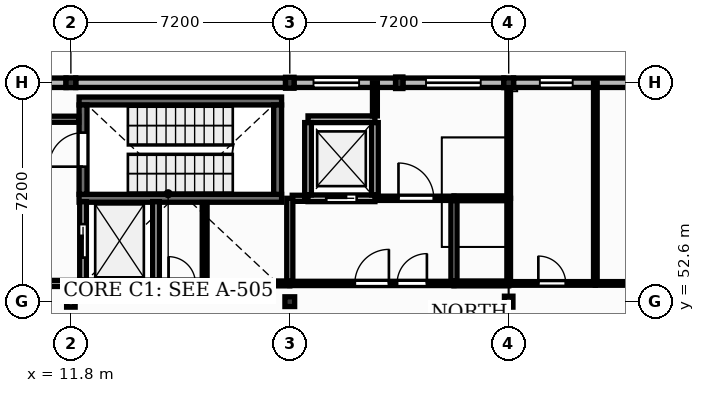
"""IFC4 building model, lengths in metres.
Left out: names, types, materials, properties, quantities, classifications, styles, units other than length and angle.
Written with IfcOpenShell. Run it as: python <this file> out.ifc"""

import sys

from ifc_helpers import new_model, si_unit, direction, frame, frame_2d, origin, origin_2d, place, context, subcontext, project, spatial, rectangle, extrude, element, fill, save


model = new_model("IFC4")
c1 = context("Model", 3, precision=1e-05, world=origin(), true_north=direction((0.0, 1.0)))
c2 = subcontext(c1, "Body", "Model", "MODEL_VIEW")
j1 = project(units=[si_unit("LENGTHUNIT", "METRE"), si_unit("PLANEANGLEUNIT", "RADIAN")], contexts=[c1])
p1 = place(None, origin())
s1 = spatial("IfcSite", under=j1, at=p1, CompositionType="ELEMENT")
p2 = place(p1, origin())
s2 = spatial("IfcBuilding", under=s1, at=p2, CompositionType="ELEMENT")
p3 = place(p2, frame((0.0, 0.0, 9.0)))
s3 = spatial("IfcBuildingStorey", under=s2, at=p3, CompositionType="ELEMENT", Elevation=9.0)
p4 = place(p3, frame((11.8, 52.6, 0.0), z_axis=(0.0, 0.0, 1.0), x_axis=(1.0, 0.0, 0.0)))
e1 = element("IfcColumn", 1, at=p4, inside=s3, PredefinedType="COLUMN", context=c2, shape_type="SweptSolid", body=[
    extrude(rectangle(XDim=0.28, YDim=0.36, at=origin_2d()), origin(), (0.0, 0.0, 1.0), 3.99),
])
for number, where, z_axis, x_axis in (
    (2, (11.8, 59.8, 0.0), (0.0, 0.0, 1.0), (1.0, 0.0, 0.0)),
    (3, (19.0, 52.6, 0.0), (0.0, 0.0, 1.0), (1.0, 0.0, 0.0)),
):
    element("IfcColumn", number, at=place(p3, frame(where, z_axis=z_axis, x_axis=x_axis)), inside=s3, PredefinedType="COLUMN", context=c2, shape_type="SweptSolid", body=[
        extrude(rectangle(XDim=0.32, YDim=0.32, at=origin_2d()), origin(), (0.0, 0.0, 1.0), 3.99),
    ])
for number, where, z_axis, x_axis in (
    (4, (19.0, 59.8, 0.0), (0.0, 0.0, 1.0), (1.0, 0.0, 0.0)),
    (5, (26.2, 52.6, 0.0), (0.0, 0.0, 1.0), (1.0, 0.0, 0.0)),
):
    element("IfcColumn", number, at=place(p3, frame(where, z_axis=z_axis, x_axis=x_axis)), inside=s3, PredefinedType="COLUMN", context=c2, shape_type="SweptSolid", body=[
        extrude(rectangle(XDim=0.28, YDim=0.36, at=origin_2d()), origin(), (0.0, 0.0, 1.0), 3.99),
    ])
p5 = place(p3, frame((26.2, 59.8, 0.0), z_axis=(0.0, 0.0, 1.0), x_axis=(1.0, 0.0, 0.0)))
e6 = element("IfcColumn", 6, at=p5, inside=s3, PredefinedType="COLUMN", context=c2, shape_type="SweptSolid", body=[
    extrude(rectangle(XDim=0.32, YDim=0.32, at=origin_2d()), origin(), (0.0, 0.0, 1.0), 3.99),
])
p6 = place(p3, frame((22.6, 59.8, 0.0), z_axis=(0.0, 0.0, 1.0), x_axis=(1.0, 0.0, 0.0)))
e7 = element("IfcColumn", 7, at=p6, inside=s3, PredefinedType="PILASTER", context=c2, shape_type="SweptSolid", body=[
    extrude(rectangle(XDim=0.24, YDim=0.38, at=origin_2d()), origin(), (0.0, 0.0, 1.0), 3.99),
])
p7 = place(p3, frame((8.32, 59.8, 0.0), z_axis=(0.0, 0.0, 1.0), x_axis=(1.0, 0.0, 0.0)))
e8 = element("IfcWall", 8, at=p7, inside=s3, PredefinedType="SOLIDWALL", context=c2, shape_type="SweptSolid", body=[
    extrude(rectangle(XDim=3.32, YDim=0.31, at=frame_2d((1.66, 0.0))), origin(), (0.0, 0.0, 1.0), 3.53),
])
p8 = place(p7, frame((1.12, 0.0, 1.0)))
e9 = element("IfcOpeningElement", 9, at=p8, cuts=e8, PredefinedType="OPENING", context=c2, shape_type="SweptSolid", body=[
    extrude(rectangle(XDim=1.08, YDim=1.95, at=frame_2d((0.54, 0.975))), frame((0.0, 0.165, 0.0), z_axis=(0.0, -1.0, 0.0), x_axis=(1.0, 0.0, 0.0)), (0.0, 0.0, 1.0), 0.33),
])
p9 = place(p3, frame((11.96, 59.8, 0.0), z_axis=(0.0, 0.0, 1.0), x_axis=(1.0, 0.0, 0.0)))
e10 = element("IfcWall", 10, at=p9, inside=s3, PredefinedType="SOLIDWALL", context=c2, shape_type="SweptSolid", body=[
    extrude(rectangle(XDim=6.9, YDim=0.31, at=frame_2d((3.45, 0.0))), origin(), (0.0, 0.0, 1.0), 3.53),
])
p10 = place(p3, frame((19.14, 59.8, 0.0), z_axis=(0.0, 0.0, 1.0), x_axis=(1.0, 0.0, 0.0)))
e11 = element("IfcWall", 11, at=p10, inside=s3, PredefinedType="SOLIDWALL", context=c2, shape_type="SweptSolid", body=[
    extrude(rectangle(XDim=3.34, YDim=0.31, at=frame_2d((1.67, 0.0))), origin(), (0.0, 0.0, 1.0), 3.53),
])
p11 = place(p10, frame((0.64, 0.0, 1.5)))
e12 = element("IfcOpeningElement", 12, at=p11, cuts=e11, PredefinedType="OPENING", context=c2, shape_type="SweptSolid", body=[
    extrude(rectangle(XDim=1.5, YDim=1.25, at=frame_2d((0.75, 0.625))), frame((0.0, 0.165, 0.0), z_axis=(0.0, -1.0, 0.0), x_axis=(1.0, 0.0, 0.0)), (0.0, 0.0, 1.0), 0.33),
])
p12 = place(p3, frame((22.72, 59.8, 0.0), z_axis=(0.0, 0.0, 1.0), x_axis=(1.0, 0.0, 0.0)))
e13 = element("IfcWall", 13, at=p12, inside=s3, PredefinedType="SOLIDWALL", context=c2, shape_type="SweptSolid", body=[
    extrude(rectangle(XDim=3.32, YDim=0.31, at=frame_2d((1.66, 0.0))), origin(), (0.0, 0.0, 1.0), 3.53),
])
p13 = place(p12, frame((0.76, 0.0, 1.0)))
e14 = element("IfcOpeningElement", 14, at=p13, cuts=e13, PredefinedType="OPENING", context=c2, shape_type="SweptSolid", body=[
    extrude(rectangle(XDim=1.8, YDim=1.8, at=frame_2d((0.9, 0.9))), frame((0.0, 0.165, 0.0), z_axis=(0.0, -1.0, 0.0), x_axis=(1.0, 0.0, 0.0)), (0.0, 0.0, 1.0), 0.33),
])
p14 = place(p3, frame((26.36, 59.8, 0.0), z_axis=(0.0, 0.0, 1.0), x_axis=(1.0, 0.0, 0.0)))
e15 = element("IfcWall", 15, at=p14, inside=s3, PredefinedType="SOLIDWALL", context=c2, shape_type="SweptSolid", body=[
    extrude(rectangle(XDim=6.9, YDim=0.31, at=frame_2d((3.45, 0.0))), origin(), (0.0, 0.0, 1.0), 3.53),
])
p15 = place(p14, frame((0.865, 0.0, 1.0)))
e16 = element("IfcOpeningElement", 16, at=p15, cuts=e15, PredefinedType="OPENING", context=c2, shape_type="SweptSolid", body=[
    extrude(rectangle(XDim=1.08, YDim=1.95, at=frame_2d((0.54, 0.975))), frame((0.0, 0.165, 0.0), z_axis=(0.0, -1.0, 0.0), x_axis=(1.0, 0.0, 0.0)), (0.0, 0.0, 1.0), 0.33),
])
p16 = place(p14, frame((4.115, 0.0, 1.0)))
e17 = element("IfcOpeningElement", 17, at=p16, cuts=e15, PredefinedType="OPENING", context=c2, shape_type="SweptSolid", body=[
    extrude(rectangle(XDim=1.24, YDim=1.8, at=frame_2d((0.62, 0.9))), frame((0.0, 0.165, 0.0), z_axis=(0.0, -1.0, 0.0), x_axis=(1.0, 0.0, 0.0)), (0.0, 0.0, 1.0), 0.33),
])
for number, where, z_axis, x_axis in (
    (18, (12.07, 56.0, 0.0), (0.0, 0.0, 1.0), (1.0, 0.0, 0.0)),
    (19, (12.07, 59.2, 0.0), (0.0, 0.0, 1.0), (1.0, 0.0, 0.0)),
):
    element("IfcWall", number, at=place(p3, frame(where, z_axis=z_axis, x_axis=x_axis)), inside=s3, PredefinedType="SHEAR", context=c2, shape_type="SweptSolid", body=[
        extrude(rectangle(XDim=6.66, YDim=0.26, at=frame_2d((3.33, 0.0))), origin(), (0.0, 0.0, 1.0), 3.95),
    ])
p17 = place(p3, frame((12.2, 56.13, 0.0), z_axis=(0.0, 0.0, 1.0), x_axis=(0.0, 1.0, 0.0)))
e20 = element("IfcWall", 20, at=p17, inside=s3, PredefinedType="SHEAR", context=c2, shape_type="SweptSolid", body=[
    extrude(rectangle(XDim=2.94, YDim=0.26, at=frame_2d((1.47, 0.0))), origin(), (0.0, 0.0, 1.0), 3.95),
])
p18 = place(p17, frame((0.91, 0.0, 0.0)))
e21 = element("IfcOpeningElement", 21, at=p18, cuts=e20, PredefinedType="OPENING", context=c2, shape_type="SweptSolid", body=[
    extrude(rectangle(XDim=1.12, YDim=2.1, at=frame_2d((0.56, 1.05))), frame((0.0, 0.14, 0.0), z_axis=(0.0, -1.0, 0.0), x_axis=(1.0, 0.0, 0.0)), (0.0, 0.0, 1.0), 0.28),
])
p19 = place(p3, frame((18.6, 56.13, 0.0), z_axis=(0.0, 0.0, 1.0), x_axis=(0.0, 1.0, 0.0)))
e22 = element("IfcWall", 22, at=p19, inside=s3, PredefinedType="SHEAR", context=c2, shape_type="SweptSolid", body=[
    extrude(rectangle(XDim=2.94, YDim=0.26, at=frame_2d((1.47, 0.0))), origin(), (0.0, 0.0, 1.0), 3.95),
])
p20 = place(p3, frame((12.2, 53.2, 0.0), z_axis=(0.0, 0.0, 1.0), x_axis=(1.0, 0.0, 0.0)))
e23 = element("IfcWall", 23, at=p20, inside=s3, PredefinedType="SOLIDWALL", context=c2, shape_type="SweptSolid", body=[
    extrude(rectangle(XDim=2.4, YDim=0.22, at=frame_2d((1.2, 0.0))), origin(), (0.0, 0.0, 1.0), 3.95),
])
p21 = place(p3, frame((12.2, 53.31, 0.0), z_axis=(0.0, 0.0, 1.0), x_axis=(0.0, 1.0, 0.0)))
e24 = element("IfcWall", 24, at=p21, inside=s3, PredefinedType="SOLIDWALL", context=c2, shape_type="SweptSolid", body=[
    extrude(rectangle(XDim=2.58, YDim=0.22, at=frame_2d((1.29, 0.0))), origin(), (0.0, 0.0, 1.0), 3.95),
])
p22 = place(p21, frame((0.74, 0.0, 0.0)))
e25 = element("IfcOpeningElement", 25, at=p22, cuts=e24, PredefinedType="OPENING", context=c2, shape_type="SweptSolid", body=[
    extrude(rectangle(XDim=1.1, YDim=2.15, at=frame_2d((0.55, 1.075))), frame((0.0, 0.12, 0.0), z_axis=(0.0, -1.0, 0.0), x_axis=(1.0, 0.0, 0.0)), (0.0, 0.0, 1.0), 0.24),
])
p23 = place(p3, frame((14.6, 53.31, 0.0), z_axis=(0.0, 0.0, 1.0), x_axis=(0.0, 1.0, 0.0)))
e26 = element("IfcWall", 26, at=p23, inside=s3, PredefinedType="SOLIDWALL", context=c2, shape_type="SweptSolid", body=[
    extrude(rectangle(XDim=2.58, YDim=0.22, at=frame_2d((1.29, 0.0))), origin(), (0.0, 0.0, 1.0), 3.95),
])
p24 = place(p3, frame((19.6, 56.0, 0.0), z_axis=(0.0, 0.0, 1.0), x_axis=(1.0, 0.0, 0.0)))
e27 = element("IfcWall", 27, at=p24, inside=s3, PredefinedType="SOLIDWALL", context=c2, shape_type="SweptSolid", body=[
    extrude(rectangle(XDim=2.2, YDim=0.22, at=frame_2d((1.1, 0.0))), origin(), (0.0, 0.0, 1.0), 3.95),
])
p25 = place(p24, frame((0.6, 0.0, 0.0)))
e28 = element("IfcOpeningElement", 28, at=p25, cuts=e27, PredefinedType="OPENING", context=c2, shape_type="SweptSolid", body=[
    extrude(rectangle(XDim=1.0, YDim=2.15, at=frame_2d((0.5, 1.075))), frame((0.0, 0.12, 0.0), z_axis=(0.0, -1.0, 0.0), x_axis=(1.0, 0.0, 0.0)), (0.0, 0.0, 1.0), 0.24),
])
p26 = place(p3, frame((19.6, 58.6, 0.0), z_axis=(0.0, 0.0, 1.0), x_axis=(1.0, 0.0, 0.0)))
e29 = element("IfcWall", 29, at=p26, inside=s3, PredefinedType="SOLIDWALL", context=c2, shape_type="SweptSolid", body=[
    extrude(rectangle(XDim=2.2, YDim=0.22, at=frame_2d((1.1, 0.0))), origin(), (0.0, 0.0, 1.0), 3.95),
])
for number, where, z_axis, x_axis in (
    (30, (19.6, 56.11, 0.0), (0.0, 0.0, 1.0), (0.0, 1.0, 0.0)),
    (31, (21.8, 56.11, 0.0), (0.0, 0.0, 1.0), (0.0, 1.0, 0.0)),
):
    element("IfcWall", number, at=place(p3, frame(where, z_axis=z_axis, x_axis=x_axis)), inside=s3, PredefinedType="SOLIDWALL", context=c2, shape_type="SweptSolid", body=[
        extrude(rectangle(XDim=2.38, YDim=0.22, at=frame_2d((1.19, 0.0))), origin(), (0.0, 0.0, 1.0), 3.95),
    ])
p27 = place(p3, frame((7.8, 53.2, 0.0), z_axis=(0.0, 0.0, 1.0), x_axis=(1.0, 0.0, 0.0)))
e32 = element("IfcWall", 32, at=p27, inside=s3, PredefinedType="PARTITIONING", context=c2, shape_type="SweptSolid", body=[
    extrude(rectangle(XDim=4.29, YDim=0.2, at=frame_2d((2.145, 0.0))), origin(), (0.0, 0.0, 1.0), 3.96),
])
p28 = place(p27, frame((1.405, 0.0, 0.0)))
e33 = element("IfcOpeningElement", 33, at=p28, cuts=e32, PredefinedType="OPENING", context=c2, shape_type="SweptSolid", body=[
    extrude(rectangle(XDim=1.48, YDim=2.25, at=frame_2d((0.74, 1.125))), frame((0.0, 0.11, 0.0), z_axis=(0.0, -1.0, 0.0), x_axis=(1.0, 0.0, 0.0)), (0.0, 0.0, 1.0), 0.22),
])
p29 = place(p3, frame((14.71, 53.2, 0.0), z_axis=(0.0, 0.0, 1.0), x_axis=(1.0, 0.0, 0.0)))
e34 = element("IfcWall", 34, at=p29, inside=s3, PredefinedType="SOLIDWALL", context=c2, shape_type="SweptSolid", body=[
    extrude(rectangle(XDim=1.49, YDim=0.22, at=frame_2d((0.745, 0.0))), origin(), (0.0, 0.0, 1.0), 3.96),
])
p30 = place(p29, frame((0.305, 0.0, 0.0)))
e35 = element("IfcOpeningElement", 35, at=p30, cuts=e34, PredefinedType="OPENING", context=c2, shape_type="SweptSolid", body=[
    extrude(rectangle(XDim=0.88, YDim=2.05, at=frame_2d((0.44, 1.025))), frame((0.0, 0.12, 0.0), z_axis=(0.0, -1.0, 0.0), x_axis=(1.0, 0.0, 0.0)), (0.0, 0.0, 1.0), 0.24),
])
p31 = place(p3, frame((19.0, 53.2, 0.0), z_axis=(0.0, 0.0, 1.0), x_axis=(1.0, 0.0, 0.0)))
e36 = element("IfcWall", 36, at=p31, inside=s3, PredefinedType="PARTITIONING", context=c2, shape_type="SweptSolid", body=[
    extrude(rectangle(XDim=5.4, YDim=0.14, at=frame_2d((2.7, 0.0))), origin(), (0.0, 0.0, 1.0), 3.96),
])
p32 = place(p31, frame((2.14, 0.0, 0.0)))
e37 = element("IfcOpeningElement", 37, at=p32, cuts=e36, PredefinedType="OPENING", context=c2, shape_type="SweptSolid", body=[
    extrude(rectangle(XDim=1.12, YDim=2.15, at=frame_2d((0.56, 1.075))), frame((0.0, 0.08, 0.0), z_axis=(0.0, -1.0, 0.0), x_axis=(1.0, 0.0, 0.0)), (0.0, 0.0, 1.0), 0.16),
])
p33 = place(p31, frame((3.53, 0.0, 0.0)))
e38 = element("IfcOpeningElement", 38, at=p33, cuts=e36, PredefinedType="OPENING", context=c2, shape_type="SweptSolid", body=[
    extrude(rectangle(XDim=0.98, YDim=2.15, at=frame_2d((0.49, 1.075))), frame((0.0, 0.08, 0.0), z_axis=(0.0, -1.0, 0.0), x_axis=(1.0, 0.0, 0.0)), (0.0, 0.0, 1.0), 0.16),
])
p34 = place(p3, frame((21.91, 56.0, 0.0), z_axis=(0.0, 0.0, 1.0), x_axis=(1.0, 0.0, 0.0)))
e39 = element("IfcWall", 39, at=p34, inside=s3, PredefinedType="PARTITIONING", context=c2, shape_type="SweptSolid", body=[
    extrude(rectangle(XDim=2.49, YDim=0.14, at=frame_2d((1.245, 0.0))), origin(), (0.0, 0.0, 1.0), 3.96),
])
p35 = place(p34, frame((0.665, 0.0, 0.0)))
e40 = element("IfcOpeningElement", 40, at=p35, cuts=e39, PredefinedType="OPENING", context=c2, shape_type="SweptSolid", body=[
    extrude(rectangle(XDim=1.16, YDim=2.1, at=frame_2d((0.58, 1.05))), frame((0.0, 0.08, 0.0), z_axis=(0.0, -1.0, 0.0), x_axis=(1.0, 0.0, 0.0)), (0.0, 0.0, 1.0), 0.16),
])
p36 = place(p3, frame((26.2, 53.2, 0.0), z_axis=(0.0, 0.0, 1.0), x_axis=(1.0, 0.0, 0.0)))
e41 = element("IfcWall", 41, at=p36, inside=s3, PredefinedType="PLUMBINGWALL", context=c2, shape_type="SweptSolid", body=[
    extrude(rectangle(XDim=2.85, YDim=0.12, at=frame_2d((1.425, 0.0))), origin(), (0.0, 0.0, 1.0), 3.96),
])
p37 = place(p36, frame((0.975, 0.0, 0.0)))
e42 = element("IfcOpeningElement", 42, at=p37, cuts=e41, PredefinedType="OPENING", context=c2, shape_type="SweptSolid", body=[
    extrude(rectangle(XDim=0.9, YDim=2.1, at=frame_2d((0.45, 1.05))), frame((0.0, 0.07, 0.0), z_axis=(0.0, -1.0, 0.0), x_axis=(1.0, 0.0, 0.0)), (0.0, 0.0, 1.0), 0.14),
])
p38 = place(p3, frame((26.2, 56.0, 0.0), z_axis=(0.0, 0.0, 1.0), x_axis=(0.0, 1.0, 0.0)))
e43 = element("IfcWall", 43, at=p38, inside=s3, PredefinedType="PLUMBINGWALL", context=c2, shape_type="SweptSolid", body=[
    extrude(rectangle(XDim=3.64, YDim=0.12, at=frame_2d((1.82, 0.0))), origin(), (0.0, 0.0, 1.0), 3.47),
])
p39 = place(p3, frame((29.05, 53.27, 0.0), z_axis=(0.0, 0.0, 1.0), x_axis=(0.0, 1.0, 0.0)))
e44 = element("IfcWall", 44, at=p39, inside=s3, PredefinedType="PLUMBINGWALL", context=c2, shape_type="SweptSolid", body=[
    extrude(rectangle(XDim=6.53, YDim=0.12, at=frame_2d((3.265, 0.0))), origin(), (0.0, 0.0, 1.0), 3.96),
])
p40 = place(p3, frame((29.05, 53.2, 0.0), z_axis=(0.0, 0.0, 1.0), x_axis=(1.0, 0.0, 0.0)))
e45 = element("IfcWall", 45, at=p40, inside=s3, PredefinedType="PLUMBINGWALL", context=c2, shape_type="SweptSolid", body=[
    extrude(rectangle(XDim=4.35, YDim=0.12, at=frame_2d((2.175, 0.0))), origin(), (0.0, 0.0, 1.0), 3.96),
])
p41 = place(p40, frame((1.725, 0.0, 0.0)))
e46 = element("IfcOpeningElement", 46, at=p41, cuts=e45, PredefinedType="OPENING", context=c2, shape_type="SweptSolid", body=[
    extrude(rectangle(XDim=0.9, YDim=2.1, at=frame_2d((0.45, 1.05))), frame((0.0, 0.07, 0.0), z_axis=(0.0, -1.0, 0.0), x_axis=(1.0, 0.0, 0.0)), (0.0, 0.0, 1.0), 0.14),
])
p42 = place(p3, frame((16.2, 53.27, 0.0), z_axis=(0.0, 0.0, 1.0), x_axis=(0.0, 1.0, 0.0)))
e47 = element("IfcWall", 47, at=p42, inside=s3, PredefinedType="PARTITIONING", context=c2, shape_type="SweptSolid", body=[
    extrude(rectangle(XDim=2.59, YDim=0.16, at=frame_2d((1.295, 0.0))), origin(), (0.0, 0.0, 1.0), 3.96),
])
p43 = place(p3, frame((12.06, 58.6, 0.0), z_axis=(0.0, 0.0, 1.0), x_axis=(-1.0, 0.0, 0.0)))
e48 = element("IfcWall", 48, at=p43, inside=s3, PredefinedType="PARTITIONING", context=c2, shape_type="SweptSolid", body=[
    extrude(rectangle(XDim=4.26, YDim=0.2, at=frame_2d((2.13, 0.0))), origin(), (0.0, 0.0, 1.0), 3.96),
])
p44 = place(p3, frame((24.4, 53.27, 0.0), z_axis=(0.0, 0.0, 1.0), x_axis=(0.0, 1.0, 0.0)))
e49 = element("IfcWall", 49, at=p44, inside=s3, PredefinedType="PARTITIONING", context=c2, shape_type="SweptSolid", body=[
    extrude(rectangle(XDim=2.66, YDim=0.2, at=frame_2d((1.33, 0.0))), origin(), (0.0, 0.0, 1.0), 3.96),
])
p45 = place(p3, frame((19.49, 56.0, 0.0), z_axis=(0.0, 0.0, 1.0), x_axis=(-1.0, 0.0, 0.0)))
e50 = element("IfcWall", 50, at=p45, inside=s3, PredefinedType="PARTITIONING", context=c2, shape_type="SweptSolid", body=[
    extrude(rectangle(XDim=0.41, YDim=0.2, at=frame_2d((0.205, 0.0))), origin(), (0.0, 0.0, 1.0), 3.96),
])
p46 = place(p3, frame((19.0, 53.27, 0.0), z_axis=(0.0, 0.0, 1.0), x_axis=(0.0, 1.0, 0.0)))
e51 = element("IfcWall", 51, at=p46, inside=s3, PredefinedType="PARTITIONING", context=c2, shape_type="SweptSolid", body=[
    extrude(rectangle(XDim=2.73, YDim=0.2, at=frame_2d((1.365, 0.0))), origin(), (0.0, 0.0, 1.0), 3.47),
])
p47 = place(p3, frame((26.2, 53.2, 0.0), z_axis=(0.0, 0.0, 1.0), x_axis=(-1.0, 0.0, 0.0)))
e52 = element("IfcWall", 52, at=p47, inside=s3, PredefinedType="PARTITIONING", context=c2, shape_type="SweptSolid", body=[
    extrude(rectangle(XDim=1.8, YDim=0.16, at=frame_2d((0.9, 0.0))), origin(), (0.0, 0.0, 1.0), 3.96),
])
p48 = place(p3, frame((19.0, 53.2, 0.0), z_axis=(0.0, 0.0, 1.0), x_axis=(-1.0, 0.0, 0.0)))
e53 = element("IfcWall", 53, at=p48, inside=s3, PredefinedType="PARTITIONING", context=c2, shape_type="SweptSolid", body=[
    extrude(rectangle(XDim=2.8, YDim=0.16, at=frame_2d((1.4, 0.0))), origin(), (0.0, 0.0, 1.0), 3.96),
])
p49 = place(p3, frame((26.2, 53.27, 0.0), z_axis=(0.0, 0.0, 1.0), x_axis=(0.0, 1.0, 0.0)))
e54 = element("IfcWall", 54, at=p49, inside=s3, PredefinedType="PLUMBINGWALL", context=c2, shape_type="SweptSolid", body=[
    extrude(rectangle(XDim=2.73, YDim=0.12, at=frame_2d((1.365, 0.0))), origin(), (0.0, 0.0, 1.0), 3.47),
])
p50 = place(p3, frame((24.4, 56.0, 0.0), z_axis=(0.0, 0.0, 1.0), x_axis=(1.0, 0.0, 0.0)))
e55 = element("IfcWall", 55, at=p50, inside=s3, PredefinedType="PARTITIONING", context=c2, shape_type="SweptSolid", body=[
    extrude(rectangle(XDim=1.8, YDim=0.16, at=frame_2d((0.9, 0.0))), origin(), (0.0, 0.0, 1.0), 3.96),
])
p51 = place(p3, frame((21.8, 58.71, 0.0), z_axis=(0.0, 0.0, 1.0), x_axis=(0.0, 1.0, 0.0)))
e56 = element("IfcWall", 56, at=p51, inside=s3, PredefinedType="PARTITIONING", context=c2, shape_type="SweptSolid", body=[
    extrude(rectangle(XDim=1.09, YDim=0.16, at=frame_2d((0.545, 0.0))), origin(), (0.0, 0.0, 1.0), 3.96),
])
p52 = place(p11, origin())
e57 = element("IfcWindow", 57, at=p52, inside=s3, PartitioningType="DOUBLE_PANEL_VERTICAL", PredefinedType="WINDOW", context=c2, shape_type="SweptSolid", body=[
    extrude(rectangle(XDim=1.5, YDim=1.25, at=frame_2d((0.75, 0.625))), frame((0.0, 0.03, 0.0), z_axis=(0.0, -1.0, 0.0), x_axis=(1.0, 0.0, 0.0)), (0.0, 0.0, 1.0), 0.06),
])
fill(e12, e57)
p53 = place(p13, origin())
e58 = element("IfcWindow", 58, at=p53, inside=s3, PartitioningType="DOUBLE_PANEL_VERTICAL", PredefinedType="WINDOW", context=c2, shape_type="SweptSolid", body=[
    extrude(rectangle(XDim=1.8, YDim=1.8, at=frame_2d((0.9, 0.9))), frame((0.0, 0.03, 0.0), z_axis=(0.0, -1.0, 0.0), x_axis=(1.0, 0.0, 0.0)), (0.0, 0.0, 1.0), 0.06),
])
fill(e14, e58)
p54 = place(p15, origin())
e59 = element("IfcWindow", 59, at=p54, inside=s3, PartitioningType="SINGLE_PANEL", PredefinedType="WINDOW", context=c2, shape_type="SweptSolid", body=[
    extrude(rectangle(XDim=1.08, YDim=1.95, at=frame_2d((0.54, 0.975))), frame((0.0, 0.03, 0.0), z_axis=(0.0, -1.0, 0.0), x_axis=(1.0, 0.0, 0.0)), (0.0, 0.0, 1.0), 0.06),
])
fill(e16, e59)
p55 = place(p22, origin())
e60 = element("IfcDoor", 60, at=p55, inside=s3, OperationType="SLIDING_TO_LEFT", PredefinedType="DOOR", context=c2, shape_type="SweptSolid", body=[
    extrude(rectangle(XDim=1.1, YDim=2.15, at=frame_2d((0.55, 1.075))), frame((0.0, 0.025, 0.0), z_axis=(0.0, -1.0, 0.0), x_axis=(1.0, 0.0, 0.0)), (0.0, 0.0, 1.0), 0.05),
])
fill(e25, e60)
p56 = place(p25, origin())
e61 = element("IfcDoor", 61, at=p56, inside=s3, OperationType="SLIDING_TO_LEFT", PredefinedType="DOOR", context=c2, shape_type="SweptSolid", body=[
    extrude(rectangle(XDim=1.0, YDim=2.15, at=frame_2d((0.5, 1.075))), frame((0.0, 0.025, 0.0), z_axis=(0.0, -1.0, 0.0), x_axis=(1.0, 0.0, 0.0)), (0.0, 0.0, 1.0), 0.05),
])
fill(e28, e61)
p57 = place(p18, origin())
e62 = element("IfcDoor", 62, at=p57, inside=s3, OperationType="SINGLE_SWING_LEFT", PredefinedType="DOOR", context=c2, shape_type="SweptSolid", body=[
    extrude(rectangle(XDim=1.12, YDim=2.1, at=frame_2d((0.56, 1.05))), frame((0.0, 0.025, 0.0), z_axis=(0.0, -1.0, 0.0), x_axis=(1.0, 0.0, 0.0)), (0.0, 0.0, 1.0), 0.05),
])
fill(e21, e62)
p58 = place(p32, origin())
e63 = element("IfcDoor", 63, at=p58, inside=s3, OperationType="SINGLE_SWING_RIGHT", PredefinedType="DOOR", context=c2, shape_type="SweptSolid", body=[
    extrude(rectangle(XDim=1.12, YDim=2.15, at=frame_2d((0.56, 1.075))), frame((0.0, 0.025, 0.0), z_axis=(0.0, -1.0, 0.0), x_axis=(1.0, 0.0, 0.0)), (0.0, 0.0, 1.0), 0.05),
])
fill(e37, e63)
p59 = place(p33, origin())
e64 = element("IfcDoor", 64, at=p59, inside=s3, OperationType="SINGLE_SWING_RIGHT", PredefinedType="DOOR", context=c2, shape_type="SweptSolid", body=[
    extrude(rectangle(XDim=0.98, YDim=2.15, at=frame_2d((0.49, 1.075))), frame((0.0, 0.025, 0.0), z_axis=(0.0, -1.0, 0.0), x_axis=(1.0, 0.0, 0.0)), (0.0, 0.0, 1.0), 0.05),
])
fill(e38, e64)
p60 = place(p30, origin())
e65 = element("IfcDoor", 65, at=p60, inside=s3, OperationType="SINGLE_SWING_LEFT", PredefinedType="DOOR", context=c2, shape_type="SweptSolid", body=[
    extrude(rectangle(XDim=0.88, YDim=2.05, at=frame_2d((0.44, 1.025))), frame((0.0, 0.025, 0.0), z_axis=(0.0, -1.0, 0.0), x_axis=(1.0, 0.0, 0.0)), (0.0, 0.0, 1.0), 0.05),
])
fill(e35, e65)
p61 = place(p37, origin())
e66 = element("IfcDoor", 66, at=p61, inside=s3, OperationType="SINGLE_SWING_LEFT", PredefinedType="DOOR", context=c2, shape_type="SweptSolid", body=[
    extrude(rectangle(XDim=0.9, YDim=2.1, at=frame_2d((0.45, 1.05))), frame((0.0, 0.025, 0.0), z_axis=(0.0, -1.0, 0.0), x_axis=(1.0, 0.0, 0.0)), (0.0, 0.0, 1.0), 0.05),
])
fill(e42, e66)
p62 = place(p35, origin())
e67 = element("IfcDoor", 67, at=p62, inside=s3, OperationType="SINGLE_SWING_LEFT", PredefinedType="DOOR", context=c2, shape_type="SweptSolid", body=[
    extrude(rectangle(XDim=1.16, YDim=2.1, at=frame_2d((0.58, 1.05))), frame((0.0, 0.025, 0.0), z_axis=(0.0, -1.0, 0.0), x_axis=(1.0, 0.0, 0.0)), (0.0, 0.0, 1.0), 0.05),
])
fill(e40, e67)
save(model, sys.argv[1])
